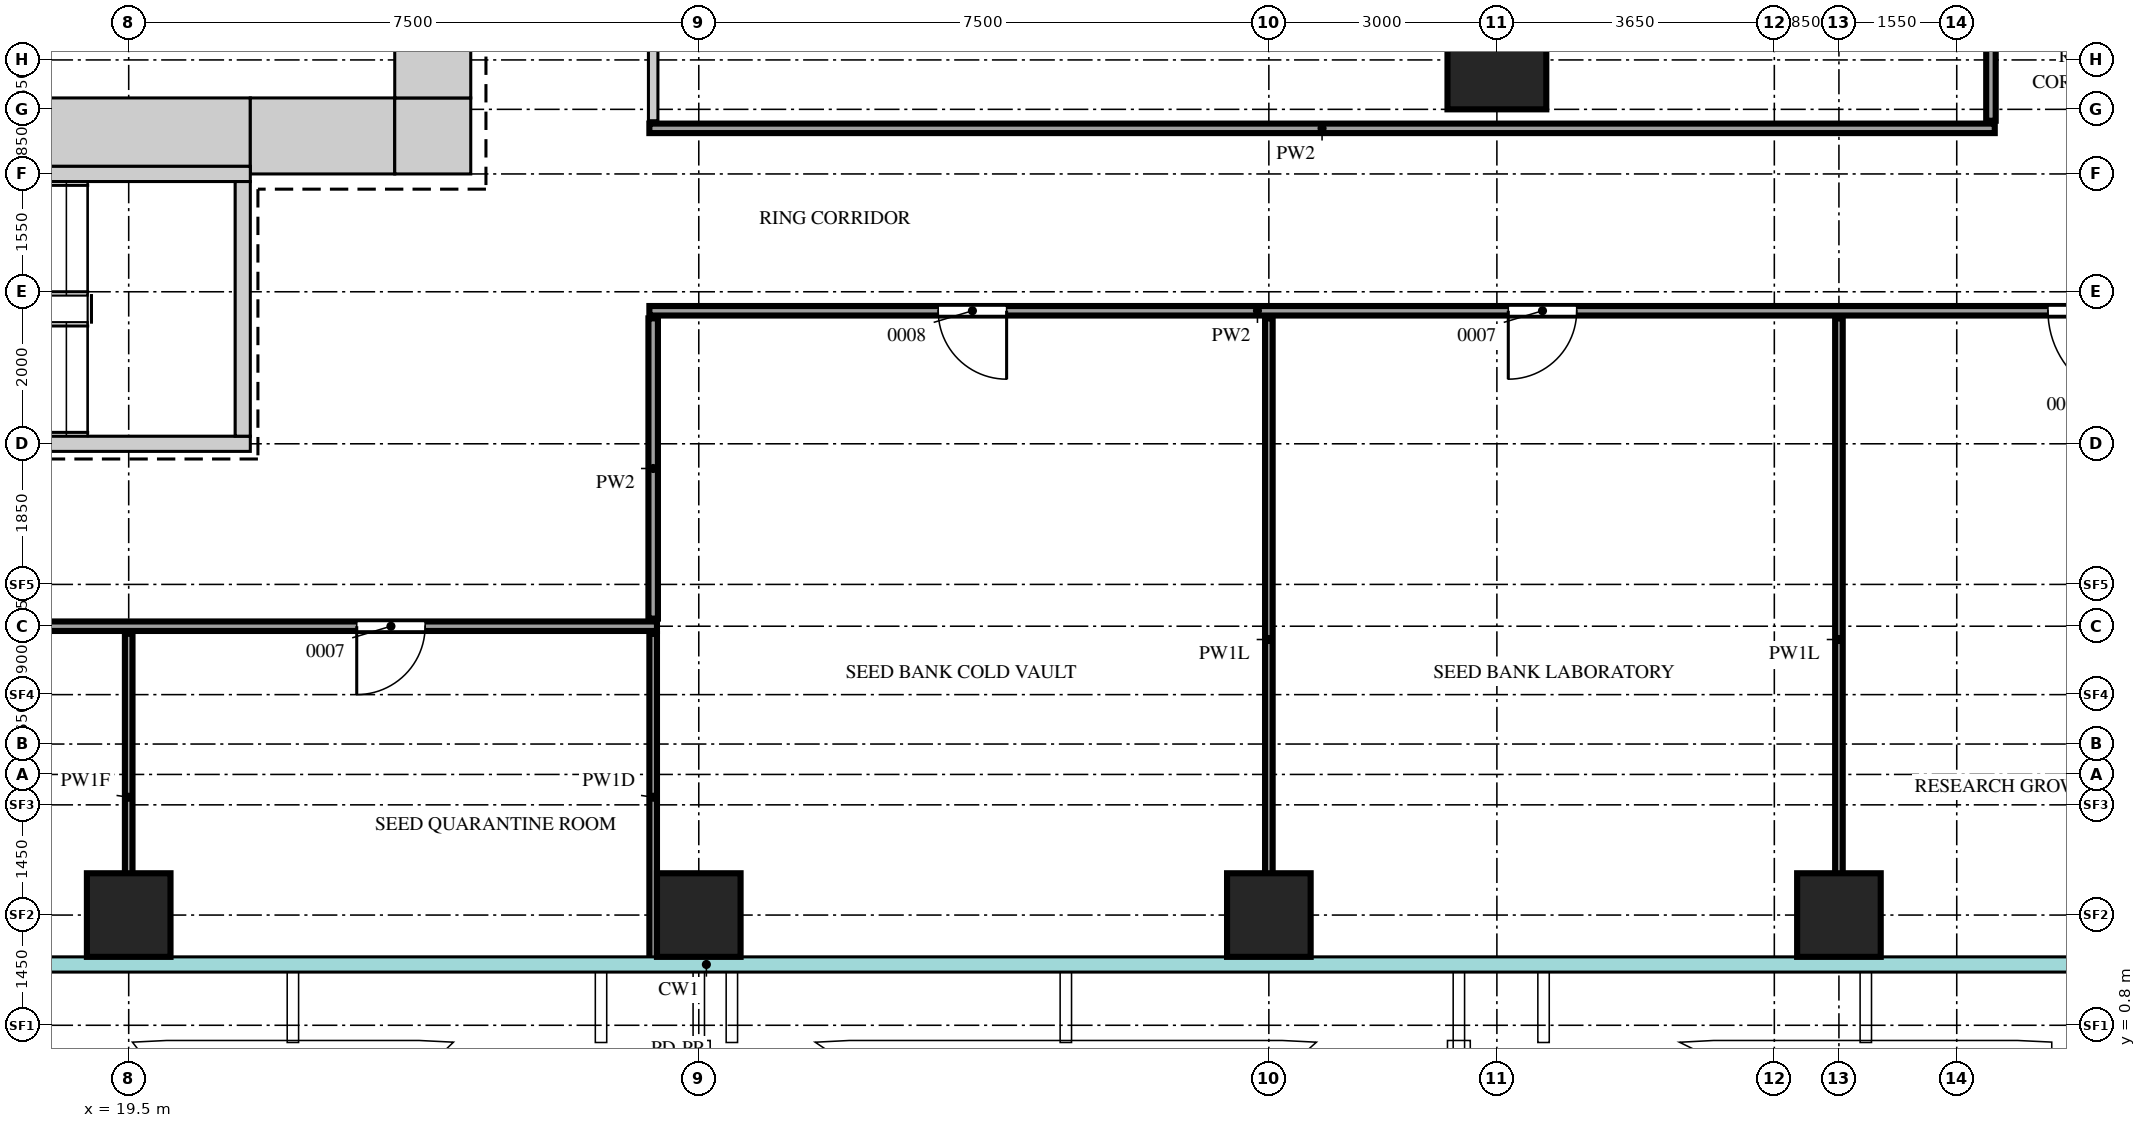
"""IFC4 building model, lengths in metres.
Left out: names, types, materials, properties, quantities, classifications, styles, units other than length and angle.
Written with IfcOpenShell. Run it as: python <this file> out.ifc"""

import sys

from ifc_helpers import new_model, si_unit, direction, frame, frame_2d, origin, origin_2d, place, context, subcontext, project, spatial, rectangle, extrude, source, transform, mapped, element, fill, save


model = new_model("IFC4")
c1 = context("Model", 3, precision=1e-05, world=origin(), true_north=direction((0.0, 1.0)))
c2 = subcontext(c1, "Body", "Model", "MODEL_VIEW")
j1 = project(units=[si_unit("LENGTHUNIT", "METRE"), si_unit("PLANEANGLEUNIT", "RADIAN")], contexts=[c1])
p1 = place(None, origin())
s1 = spatial("IfcSite", under=j1, at=p1, CompositionType="ELEMENT")
p2 = place(p1, origin())
s2 = spatial("IfcBuilding", under=s1, at=p2, CompositionType="ELEMENT")
p3 = place(p2, frame((0.0, 0.0, 101.5)))
s3 = spatial("IfcBuildingStorey", under=s2, at=p3, CompositionType="ELEMENT", Elevation=101.5)
m1 = source(origin(), c2, "Body", "SweptSolid", [
    extrude(rectangle(XDim=7.2, YDim=0.9, at=frame_2d((3.6, 0.0))), origin(), (0.0, 0.0, 1.0), 4.1),
])
p4 = place(p3, frame((13.9, 12.55, 0.0), z_axis=(0.0, 0.0, 1.0), x_axis=(1.0, 0.0, 0.0)))
e1 = element("IfcWall", 1, at=p4, inside=s3, PredefinedType="SHEAR", context=c2, shape_type="MappedRepresentation", body=[
    mapped(m1, transform((0.0, 0.0, 0.0))),
])
m2 = source(origin(), c2, "Body", "SweptSolid", [
    extrude(rectangle(XDim=1.0, YDim=2.1, at=frame_2d((0.5, 1.05))), frame((0.0, 0.46, 0.0), z_axis=(0.0, -1.0, 0.0), x_axis=(1.0, 0.0, 0.0)), (0.0, 0.0, 1.0), 0.92),
])
p5 = place(p4, frame((0.8, 0.0, 0.0)))
e2 = element("IfcOpeningElement", 2, at=p5, cuts=e1, PredefinedType="OPENING", context=c2, shape_type="MappedRepresentation", body=[
    mapped(m2, transform((0.0, 0.0, 0.0))),
])
m3 = source(origin(), c2, "Body", "SweptSolid", [
    extrude(rectangle(XDim=1.9, YDim=1.0, at=frame_2d((0.95, 0.0))), origin(), (0.0, 0.0, 1.0), 4.1),
])
p6 = place(p3, frame((21.1, 12.5, 0.0), z_axis=(0.0, 0.0, 1.0), x_axis=(1.0, 0.0, 0.0)))
e3 = element("IfcWall", 3, at=p6, inside=s3, PredefinedType="SHEAR", context=c2, shape_type="MappedRepresentation", body=[
    mapped(m3, transform((0.0, 0.0, 0.0))),
])
m4 = source(origin(), c2, "Body", "SweptSolid", [
    extrude(rectangle(XDim=1.0, YDim=1.0, at=frame_2d((0.5, 0.0))), origin(), (0.0, 0.0, 1.0), 4.1),
])
p7 = place(p3, frame((23.0, 12.5, 0.0), z_axis=(0.0, 0.0, 1.0), x_axis=(1.0, 0.0, 0.0)))
e4 = element("IfcWall", 4, at=p7, inside=s3, PredefinedType="SHEAR", context=c2, shape_type="MappedRepresentation", body=[
    mapped(m4, transform((0.0, 0.0, 0.0))),
])
m5 = source(origin(), c2, "Body", "SweptSolid", [
    extrude(rectangle(XDim=28.0, YDim=1.0, at=frame_2d((14.0, 0.0))), origin(), (0.0, 0.0, 1.0), 4.1),
])
p8 = place(p3, frame((23.5, 13.0, 0.0), z_axis=(0.0, 0.0, 1.0), x_axis=(0.0, 1.0, 0.0)))
e5 = element("IfcWall", 5, at=p8, inside=s3, PredefinedType="SHEAR", context=c2, shape_type="MappedRepresentation", body=[
    mapped(m5, transform((0.0, 0.0, 0.0))),
])
m6 = source(origin(), c2, "Body", "SweptSolid", [
    extrude(rectangle(XDim=1.8, YDim=2.1, at=frame_2d((0.9, 1.05))), frame((0.0, 0.51, 0.0), z_axis=(0.0, -1.0, 0.0), x_axis=(1.0, 0.0, 0.0)), (0.0, 0.0, 1.0), 1.02),
])
p9 = place(p8, frame((22.6, 0.0, 0.0)))
e6 = element("IfcOpeningElement", 6, at=p9, cuts=e5, PredefinedType="OPENING", context=c2, shape_type="MappedRepresentation", body=[
    mapped(m6, transform((0.0, 0.0, 0.0))),
])
m7 = source(origin(), c2, "Body", "SweptSolid", [
    extrude(rectangle(XDim=1.2, YDim=2.1, at=frame_2d((0.6, 1.05))), frame((0.0, 0.51, 0.0), z_axis=(0.0, -1.0, 0.0), x_axis=(1.0, 0.0, 0.0)), (0.0, 0.0, 1.0), 1.02),
])
p10 = place(p8, frame((13.85, 0.0, 0.0)))
e7 = element("IfcOpeningElement", 7, at=p10, cuts=e5, PredefinedType="OPENING", context=c2, shape_type="MappedRepresentation", body=[
    mapped(m7, transform((0.0, 0.0, 0.0))),
])
m8 = source(origin(), c2, "Body", "SweptSolid", [
    extrude(rectangle(XDim=0.9, YDim=2.1, at=frame_2d((0.45, 1.05))), frame((0.0, 0.51, 0.0), z_axis=(0.0, -1.0, 0.0), x_axis=(1.0, 0.0, 0.0)), (0.0, 0.0, 1.0), 1.02),
])
p11 = place(p8, frame((1.0, 0.0, 0.0)))
e8 = element("IfcOpeningElement", 8, at=p11, cuts=e5, PredefinedType="OPENING", context=c2, shape_type="MappedRepresentation", body=[
    mapped(m8, transform((0.0, 0.0, 0.0))),
])
p12 = place(p8, frame((4.0, 0.0, 0.0)))
e9 = element("IfcOpeningElement", 9, at=p12, cuts=e5, PredefinedType="OPENING", context=c2, shape_type="MappedRepresentation", body=[
    mapped(m8, transform((0.0, 0.0, 0.0))),
])
p13 = place(p8, frame((7.6, 0.0, 0.0)))
e10 = element("IfcOpeningElement", 10, at=p13, cuts=e5, PredefinedType="OPENING", context=c2, shape_type="MappedRepresentation", body=[
    mapped(m8, transform((0.0, 0.0, 0.0))),
])
m9 = source(origin(), c2, "Body", "SweptSolid", [
    extrude(rectangle(XDim=5.3, YDim=0.2, at=frame_2d((2.65, 0.0))), origin(), (0.0, 0.0, 1.0), 4.1),
])
p14 = place(p3, frame((15.8, 12.0, 0.0), z_axis=(0.0, 0.0, 1.0), x_axis=(1.0, 0.0, 0.0)))
e11 = element("IfcWall", 11, at=p14, inside=s3, PredefinedType="SHEAR", context=c2, shape_type="MappedRepresentation", body=[
    mapped(m9, transform((0.0, 0.0, 0.0))),
])
m10 = source(origin(), c2, "Body", "SweptSolid", [
    extrude(rectangle(XDim=7.2, YDim=0.2, at=frame_2d((3.6, 0.0))), origin(), (0.0, 0.0, 1.0), 4.1),
])
p15 = place(p3, frame((13.9, 8.45, 0.0), z_axis=(0.0, 0.0, 1.0), x_axis=(1.0, 0.0, 0.0)))
e12 = element("IfcWall", 12, at=p15, inside=s3, PredefinedType="SHEAR", context=c2, shape_type="MappedRepresentation", body=[
    mapped(m10, transform((0.0, 0.0, 0.0))),
])
m11 = source(origin(), c2, "Body", "SweptSolid", [
    extrude(rectangle(XDim=1.2, YDim=2.1, at=frame_2d((0.6, 1.05))), frame((0.0, 0.11, 0.0), z_axis=(0.0, -1.0, 0.0), x_axis=(1.0, 0.0, 0.0)), (0.0, 0.0, 1.0), 0.22),
])
p16 = place(p15, frame((0.35, 0.0, 0.0)))
e13 = element("IfcOpeningElement", 13, at=p16, cuts=e12, PredefinedType="OPENING", context=c2, shape_type="MappedRepresentation", body=[
    mapped(m11, transform((0.0, 0.0, 0.0))),
])
m12 = source(origin(), c2, "Body", "SweptSolid", [
    extrude(rectangle(XDim=3.35, YDim=0.2, at=frame_2d((1.675, 0.0))), origin(), (0.0, 0.0, 1.0), 4.1),
])
p17 = place(p3, frame((21.0, 8.55, 0.0), z_axis=(0.0, 0.0, 1.0), x_axis=(0.0, 1.0, 0.0)))
e14 = element("IfcWall", 14, at=p17, inside=s3, PredefinedType="SHEAR", context=c2, shape_type="MappedRepresentation", body=[
    mapped(m12, transform((0.0, 0.0, 0.0))),
])
m13 = source(origin(), c2, "Body", "SweptSolid", [
    extrude(rectangle(XDim=1.1, YDim=1.1, at=origin_2d()), origin(), (0.0, 0.0, 1.0), 4.1),
])
for number, where, z_axis, x_axis in (
    (15, (19.5, 2.25, 0.0), (0.0, 0.0, 1.0), (1.0, 0.0, 0.0)),
    (16, (27.0, 2.25, 0.0), (0.0, 0.0, 1.0), (1.0, 0.0, 0.0)),
    (17, (34.5, 2.25, 0.0), (0.0, 0.0, 1.0), (1.0, 0.0, 0.0)),
    (18, (42.0, 2.25, 0.0), (0.0, 0.0, 1.0), (1.0, 0.0, 0.0)),
):
    element("IfcColumn", number, at=place(p3, frame(where, z_axis=z_axis, x_axis=x_axis)), inside=s3, PredefinedType="COLUMN", context=c2, shape_type="MappedRepresentation", body=[
        mapped(m13, transform((0.0, 0.0, 0.0))),
    ])
m14 = source(origin(), c2, "Body", "SweptSolid", [
    extrude(rectangle(XDim=1.3, YDim=1.3, at=origin_2d()), origin(), (0.0, 0.0, 1.0), 4.1),
])
p18 = place(p3, frame((37.5, 13.5, 0.0), z_axis=(0.0, 0.0, 1.0), x_axis=(1.0, 0.0, 0.0)))
e19 = element("IfcColumn", 19, at=p18, inside=s3, PredefinedType="COLUMN", context=c2, shape_type="MappedRepresentation", body=[
    mapped(m14, transform((0.0, 0.0, 0.0))),
])
m15 = source(origin(), c2, "Body", "SweptSolid", [
    extrude(rectangle(XDim=4.3, YDim=0.1, at=frame_2d((2.15, 0.0))), origin(), (0.0, 0.0, 1.0), 3.77),
])
p19 = place(p3, frame((19.5, 1.65, 0.0), z_axis=(0.0, 0.0, 1.0), x_axis=(0.0, 1.0, 0.0)))
e20 = element("IfcWall", 20, at=p19, inside=s3, PredefinedType="PARTITIONING", context=c2, shape_type="MappedRepresentation", body=[
    mapped(m15, transform((0.0, 0.0, 0.0))),
])
m16 = source(origin(), c2, "Body", "SweptSolid", [
    extrude(rectangle(XDim=4.3, YDim=0.1, at=frame_2d((2.15, 0.0))), origin(), (0.0, 0.0, 1.0), 4.2),
])
p20 = place(p3, frame((26.4, 1.65, 0.0), z_axis=(0.0, 0.0, 1.0), x_axis=(0.0, 1.0, 0.0)))
e21 = element("IfcWall", 21, at=p20, inside=s3, PredefinedType="PARTITIONING", context=c2, shape_type="MappedRepresentation", body=[
    mapped(m16, transform((0.0, 0.0, 0.0))),
])
m17 = source(origin(), c2, "Body", "SweptSolid", [
    extrude(rectangle(XDim=8.45, YDim=0.1, at=frame_2d((4.225, 0.0))), origin(), (0.0, 0.0, 1.0), 3.6),
])
for number, where, z_axis, x_axis in (
    (22, (34.5, 1.65, 0.0), (0.0, 0.0, 1.0), (0.0, 1.0, 0.0)),
    (23, (42.0, 1.65, 0.0), (0.0, 0.0, 1.0), (0.0, 1.0, 0.0)),
):
    element("IfcWall", number, at=place(p3, frame(where, z_axis=z_axis, x_axis=x_axis)), inside=s3, PredefinedType="PARTITIONING", context=c2, shape_type="MappedRepresentation", body=[
        mapped(m17, transform((0.0, 0.0, 0.0))),
    ])
m18 = source(origin(), c2, "Body", "SweptSolid", [
    extrude(rectangle(XDim=22.3, YDim=0.125, at=frame_2d((11.15, 0.0))), origin(), (0.0, 0.0, 1.0), 3.55),
])
p21 = place(p3, frame((4.15, 6.05, 0.0), z_axis=(0.0, 0.0, 1.0), x_axis=(1.0, 0.0, 0.0)))
e24 = element("IfcWall", 24, at=p21, inside=s3, PredefinedType="PARTITIONING", context=c2, shape_type="MappedRepresentation", body=[
    mapped(m18, transform((0.0, 0.0, 0.0))),
])
m19 = source(origin(), c2, "Body", "SweptSolid", [
    extrude(rectangle(XDim=0.9, YDim=2.1, at=frame_2d((0.45, 1.05))), frame((0.0, 0.073, 0.0), z_axis=(0.0, -1.0, 0.0), x_axis=(1.0, 0.0, 0.0)), (0.0, 0.0, 1.0), 0.145),
])
p22 = place(p21, frame((3.5, 0.0, 0.0)))
e25 = element("IfcOpeningElement", 25, at=p22, cuts=e24, PredefinedType="OPENING", context=c2, shape_type="MappedRepresentation", body=[
    mapped(m19, transform((0.0, 0.0, 0.0))),
])
p23 = place(p21, frame((11.0, 0.0, 0.0)))
e26 = element("IfcOpeningElement", 26, at=p23, cuts=e24, PredefinedType="OPENING", context=c2, shape_type="MappedRepresentation", body=[
    mapped(m19, transform((0.0, 0.0, 0.0))),
])
p24 = place(p21, frame((18.35, 0.0, 0.0)))
e27 = element("IfcOpeningElement", 27, at=p24, cuts=e24, PredefinedType="OPENING", context=c2, shape_type="MappedRepresentation", body=[
    mapped(m19, transform((0.0, 0.0, 0.0))),
])
m20 = source(origin(), c2, "Body", "SweptSolid", [
    extrude(rectangle(XDim=3.95, YDim=0.125, at=frame_2d((1.975, 0.0))), origin(), (0.0, 0.0, 1.0), 4.2),
])
p25 = place(p3, frame((26.4, 6.15, 0.0), z_axis=(0.0, 0.0, 1.0), x_axis=(0.0, 1.0, 0.0)))
e28 = element("IfcWall", 28, at=p25, inside=s3, PredefinedType="PARTITIONING", context=c2, shape_type="MappedRepresentation", body=[
    mapped(m20, transform((0.0, 0.0, 0.0))),
])
m21 = source(origin(), c2, "Body", "SweptSolid", [
    extrude(rectangle(XDim=20.0, YDim=0.125, at=frame_2d((10.0, 0.0))), origin(), (0.0, 0.0, 1.0), 4.2),
])
p26 = place(p3, frame((26.35, 10.2, 0.0), z_axis=(0.0, 0.0, 1.0), x_axis=(1.0, 0.0, 0.0)))
e29 = element("IfcWall", 29, at=p26, inside=s3, PredefinedType="PARTITIONING", context=c2, shape_type="MappedRepresentation", body=[
    mapped(m21, transform((0.0, 0.0, 0.0))),
])
p27 = place(p26, frame((3.8, 0.0, 0.0)))
e30 = element("IfcOpeningElement", 30, at=p27, cuts=e29, PredefinedType="OPENING", context=c2, shape_type="MappedRepresentation", body=[
    mapped(m19, transform((0.0, 0.0, 0.0))),
])
p28 = place(p26, frame((11.3, 0.0, 0.0)))
e31 = element("IfcOpeningElement", 31, at=p28, cuts=e29, PredefinedType="OPENING", context=c2, shape_type="MappedRepresentation", body=[
    mapped(m19, transform((0.0, 0.0, 0.0))),
])
m22 = source(origin(), c2, "Body", "SweptSolid", [
    extrude(rectangle(XDim=1.2, YDim=2.1, at=frame_2d((0.6, 1.05))), frame((0.0, 0.073, 0.0), z_axis=(0.0, -1.0, 0.0), x_axis=(1.0, 0.0, 0.0)), (0.0, 0.0, 1.0), 0.145),
])
p29 = place(p26, frame((18.4, 0.0, 0.0)))
e32 = element("IfcOpeningElement", 32, at=p29, cuts=e29, PredefinedType="OPENING", context=c2, shape_type="MappedRepresentation", body=[
    mapped(m22, transform((0.0, 0.0, 0.0))),
])
m23 = source(origin(), c2, "Body", "SweptSolid", [
    extrude(rectangle(XDim=17.7, YDim=0.125, at=frame_2d((8.85, 0.0))), origin(), (0.0, 0.0, 1.0), 4.2),
])
p30 = place(p3, frame((26.35, 12.6, 0.0), z_axis=(0.0, 0.0, 1.0), x_axis=(1.0, 0.0, 0.0)))
e33 = element("IfcWall", 33, at=p30, inside=s3, PredefinedType="PARTITIONING", context=c2, shape_type="MappedRepresentation", body=[
    mapped(m23, transform((0.0, 0.0, 0.0))),
])
m24 = source(origin(), c2, "Body", "SweptSolid", [
    extrude(rectangle(XDim=23.2, YDim=0.125, at=frame_2d((11.6, 0.0))), origin(), (0.0, 0.0, 1.0), 4.2),
])
p31 = place(p3, frame((26.4, 12.7, 0.0), z_axis=(0.0, 0.0, 1.0), x_axis=(0.0, 1.0, 0.0)))
e34 = element("IfcWall", 34, at=p31, inside=s3, PredefinedType="PARTITIONING", context=c2, shape_type="MappedRepresentation", body=[
    mapped(m24, transform((0.0, 0.0, 0.0))),
])
p32 = place(p31, frame((2.15, 0.0, 0.0)))
e35 = element("IfcOpeningElement", 35, at=p32, cuts=e34, PredefinedType="OPENING", context=c2, shape_type="MappedRepresentation", body=[
    mapped(m19, transform((0.0, 0.0, 0.0))),
])
p33 = place(p31, frame((18.2, 0.0, 0.0)))
e36 = element("IfcOpeningElement", 36, at=p33, cuts=e34, PredefinedType="OPENING", context=c2, shape_type="MappedRepresentation", body=[
    mapped(m22, transform((0.0, 0.0, 0.0))),
])
m25 = source(origin(), c2, "Body", "SweptSolid", [
    extrude(rectangle(XDim=32.85, YDim=0.125, at=frame_2d((16.425, 0.0))), origin(), (0.0, 0.0, 1.0), 4.2),
])
p34 = place(p3, frame((44.0, 12.7, 0.0), z_axis=(0.0, 0.0, 1.0), x_axis=(0.0, 1.0, 0.0)))
e37 = element("IfcWall", 37, at=p34, inside=s3, PredefinedType="PARTITIONING", context=c2, shape_type="MappedRepresentation", body=[
    mapped(m25, transform((0.0, 0.0, 0.0))),
])
p35 = place(p34, frame((9.2, 0.0, 0.0)))
e38 = element("IfcOpeningElement", 38, at=p35, cuts=e37, PredefinedType="OPENING", context=c2, shape_type="MappedRepresentation", body=[
    mapped(m22, transform((0.0, 0.0, 0.0))),
])
p36 = place(p34, frame((27.5, 0.0, 0.0)))
e39 = element("IfcOpeningElement", 39, at=p36, cuts=e37, PredefinedType="OPENING", context=c2, shape_type="MappedRepresentation", body=[
    mapped(m22, transform((0.0, 0.0, 0.0))),
])
m26 = source(origin(), c2, "Body", "SweptSolid", [
    extrude(rectangle(XDim=0.9, YDim=2.1, at=frame_2d((0.45, 1.05))), frame((0.0, 0.025, 0.0), z_axis=(0.0, -1.0, 0.0), x_axis=(1.0, 0.0, 0.0)), (0.0, 0.0, 1.0), 0.05),
])
p37 = place(p27, origin())
e40 = element("IfcDoor", 40, at=p37, inside=s3, OperationType="SINGLE_SWING_RIGHT", PredefinedType="DOOR", context=c2, shape_type="MappedRepresentation", body=[
    mapped(m26, transform((0.0, 0.0, 0.0))),
])
fill(e30, e40)
p38 = place(p28, origin())
e41 = element("IfcDoor", 41, at=p38, inside=s3, OperationType="SINGLE_SWING_LEFT", PredefinedType="DOOR", context=c2, shape_type="MappedRepresentation", body=[
    mapped(m26, transform((0.0, 0.0, 0.0))),
])
fill(e31, e41)
m27 = source(origin(), c2, "Body", "SweptSolid", [
    extrude(rectangle(XDim=1.2, YDim=2.1, at=frame_2d((0.6, 1.05))), frame((0.0, 0.025, 0.0), z_axis=(0.0, -1.0, 0.0), x_axis=(1.0, 0.0, 0.0)), (0.0, 0.0, 1.0), 0.05),
])
p39 = place(p29, origin())
e42 = element("IfcDoor", 42, at=p39, inside=s3, OperationType="SINGLE_SWING_RIGHT", PredefinedType="DOOR", context=c2, shape_type="MappedRepresentation", body=[
    mapped(m27, transform((0.0, 0.0, 0.0))),
])
fill(e32, e42)
p40 = place(p24, origin())
e43 = element("IfcDoor", 43, at=p40, inside=s3, OperationType="SINGLE_SWING_LEFT", PredefinedType="DOOR", context=c2, shape_type="MappedRepresentation", body=[
    mapped(m26, transform((0.0, 0.0, 0.0))),
])
fill(e27, e43)
save(model, sys.argv[1])
